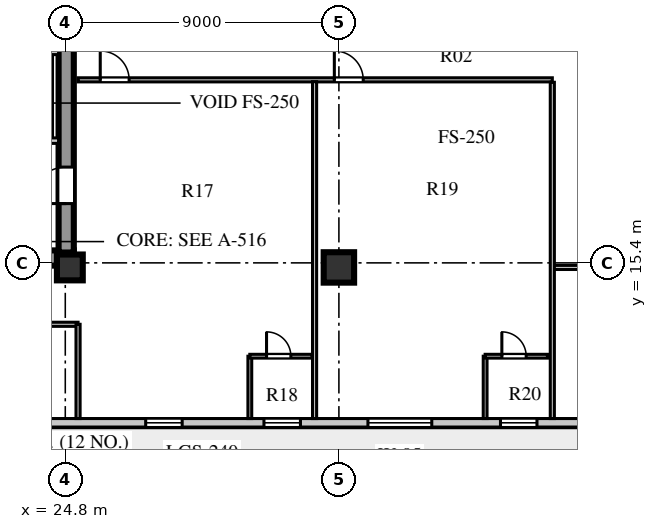
"""IFC4 building model, lengths in metres.
Left out: names, types, materials, properties, quantities, classifications, styles, units other than length and angle.
Written with IfcOpenShell. Run it as: python <this file> out.ifc"""

import sys

from ifc_helpers import new_model, si_unit, direction, frame, frame_2d, origin, origin_2d, place, context, subcontext, project, spatial, rectangle, extrude, element, fill, save


model = new_model("IFC4")
c1 = context("Model", 3, precision=1e-05, world=origin(), true_north=direction((0.0, 1.0)))
c2 = subcontext(c1, "Body", "Model", "MODEL_VIEW")
j1 = project(units=[si_unit("LENGTHUNIT", "METRE"), si_unit("PLANEANGLEUNIT", "RADIAN")], contexts=[c1])
p1 = place(None, origin())
s1 = spatial("IfcSite", under=j1, at=p1, CompositionType="ELEMENT")
p2 = place(p1, origin())
s2 = spatial("IfcBuilding", under=s1, at=p2, CompositionType="ELEMENT")
p3 = place(p2, frame((0.0, 0.0, 119.4)))
s3 = spatial("IfcBuildingStorey", under=s2, at=p3, CompositionType="ELEMENT", Elevation=119.4)
p4 = place(p3, frame((15.4, 15.56, 0.0), z_axis=(0.0, 0.0, 1.0), x_axis=(1.0, 0.0, 0.0)))
e1 = element("IfcWall", 1, at=p4, inside=s3, PredefinedType="SHEAR", context=c2, shape_type="SweptSolid", body=[
    extrude(rectangle(XDim=9.68, YDim=0.5, at=frame_2d((4.84, 0.0))), origin(), (0.0, 0.0, 1.0), 3.6),
])
p5 = place(p3, frame((24.83, 15.74, 0.0), z_axis=(0.0, 0.0, 1.0), x_axis=(0.0, 1.0, 0.0)))
e2 = element("IfcWall", 2, at=p5, inside=s3, PredefinedType="SHEAR", context=c2, shape_type="SweptSolid", body=[
    extrude(rectangle(XDim=25.76, YDim=0.5, at=frame_2d((12.88, 0.0))), origin(), (0.0, 0.0, 1.0), 3.6),
])
p6 = place(p5, frame((1.61, 0.0, 0.0)))
e3 = element("IfcOpeningElement", 3, at=p6, cuts=e2, PredefinedType="OPENING", context=c2, shape_type="SweptSolid", body=[
    extrude(rectangle(XDim=1.2, YDim=2.1, at=frame_2d((0.6, 1.05))), frame((0.0, 0.26, 0.0), z_axis=(0.0, -1.0, 0.0), x_axis=(1.0, 0.0, 0.0)), (0.0, 0.0, 1.0), 0.52),
])
p7 = place(p5, frame((6.78, 0.0, 0.0)))
e4 = element("IfcOpeningElement", 4, at=p7, cuts=e2, PredefinedType="OPENING", context=c2, shape_type="SweptSolid", body=[
    extrude(rectangle(XDim=0.85, YDim=2.06, at=frame_2d((0.425, 1.03))), frame((0.0, 0.26, 0.0), z_axis=(0.0, -1.0, 0.0), x_axis=(1.0, 0.0, 0.0)), (0.0, 0.0, 1.0), 0.52),
])
p8 = place(p5, frame((12.11, 0.0, 0.0)))
e5 = element("IfcOpeningElement", 5, at=p8, cuts=e2, PredefinedType="OPENING", context=c2, shape_type="SweptSolid", body=[
    extrude(rectangle(XDim=1.5, YDim=2.12, at=frame_2d((0.75, 1.06))), frame((0.0, 0.26, 0.0), z_axis=(0.0, -1.0, 0.0), x_axis=(1.0, 0.0, 0.0)), (0.0, 0.0, 1.0), 0.52),
])
p9 = place(p5, frame((20.11, 0.0, 0.0)))
e6 = element("IfcOpeningElement", 6, at=p9, cuts=e2, PredefinedType="OPENING", context=c2, shape_type="SweptSolid", body=[
    extrude(rectangle(XDim=1.2, YDim=2.12, at=frame_2d((0.6, 1.06))), frame((0.0, 0.26, 0.0), z_axis=(0.0, -1.0, 0.0), x_axis=(1.0, 0.0, 0.0)), (0.0, 0.0, 1.0), 0.52),
])
p10 = place(p5, frame((24.01, 0.0, 0.0)))
e7 = element("IfcOpeningElement", 7, at=p10, cuts=e2, PredefinedType="OPENING", context=c2, shape_type="SweptSolid", body=[
    extrude(rectangle(XDim=0.95, YDim=2.1, at=frame_2d((0.475, 1.05))), frame((0.0, 0.26, 0.0), z_axis=(0.0, -1.0, 0.0), x_axis=(1.0, 0.0, 0.0)), (0.0, 0.0, 1.0), 0.52),
])
p11 = place(p3, frame((24.95, 15.25, 0.0), z_axis=(0.0, 0.0, 1.0), x_axis=(1.0, 0.0, 0.0)))
e8 = element("IfcColumn", 8, at=p11, inside=s3, PredefinedType="COLUMN", context=c2, shape_type="SweptSolid", body=[
    extrude(rectangle(XDim=0.85, YDim=0.85, at=origin_2d()), origin(), (0.0, 0.0, 1.0), 3.6),
])
p12 = place(p3, frame((33.8, 15.25, 0.0), z_axis=(0.0, 0.0, 1.0), x_axis=(1.0, 0.0, 0.0)))
e9 = element("IfcColumn", 9, at=p12, inside=s3, PredefinedType="COLUMN", context=c2, shape_type="SweptSolid", body=[
    extrude(rectangle(XDim=1.0, YDim=1.0, at=origin_2d()), origin(), (0.0, 0.0, 1.0), 3.6),
])
p13 = place(p3, frame((13.25, 10.14, 0.0), z_axis=(0.0, 0.0, 1.0), x_axis=(1.0, 0.0, 0.0)))
e10 = element("IfcWall", 10, at=p13, inside=s3, PredefinedType="STANDARD", context=c2, shape_type="SweptSolid", body=[
    extrude(rectangle(XDim=32.1, YDim=0.28, at=frame_2d((16.05, 0.0))), origin(), (0.0, 0.0, 1.0), 3.6),
])
p14 = place(p13, frame((0.95, 0.0, 0.0)))
e11 = element("IfcOpeningElement", 11, at=p14, cuts=e10, PredefinedType="OPENING", context=c2, shape_type="SweptSolid", body=[
    extrude(rectangle(XDim=1.0, YDim=2.05, at=frame_2d((0.5, 1.025))), frame((0.0, 0.15, 0.0), z_axis=(0.0, -1.0, 0.0), x_axis=(1.0, 0.0, 0.0)), (0.0, 0.0, 1.0), 0.3),
])
p15 = place(p13, frame((6.18, 0.0, 0.8)))
e12 = element("IfcOpeningElement", 12, at=p15, cuts=e10, PredefinedType="OPENING", context=c2, shape_type="SweptSolid", body=[
    extrude(rectangle(XDim=1.5, YDim=2.0, at=frame_2d((0.75, 1.0))), frame((0.0, 0.15, 0.0), z_axis=(0.0, -1.0, 0.0), x_axis=(1.0, 0.0, 0.0)), (0.0, 0.0, 1.0), 0.3),
])
p16 = place(p13, frame((14.195, 0.0, 0.8)))
e13 = element("IfcOpeningElement", 13, at=p16, cuts=e10, PredefinedType="OPENING", context=c2, shape_type="SweptSolid", body=[
    extrude(rectangle(XDim=1.2, YDim=1.75, at=frame_2d((0.6, 0.875))), frame((0.0, 0.15, 0.0), z_axis=(0.0, -1.0, 0.0), x_axis=(1.0, 0.0, 0.0)), (0.0, 0.0, 1.0), 0.3),
])
p17 = place(p13, frame((18.085, 0.0, 0.8)))
e14 = element("IfcOpeningElement", 14, at=p17, cuts=e10, PredefinedType="OPENING", context=c2, shape_type="SweptSolid", body=[
    extrude(rectangle(XDim=1.2, YDim=1.75, at=frame_2d((0.6, 0.875))), frame((0.0, 0.15, 0.0), z_axis=(0.0, -1.0, 0.0), x_axis=(1.0, 0.0, 0.0)), (0.0, 0.0, 1.0), 0.3),
])
p18 = place(p13, frame((21.505, 0.0, 0.8)))
e15 = element("IfcOpeningElement", 15, at=p18, cuts=e10, PredefinedType="OPENING", context=c2, shape_type="SweptSolid", body=[
    extrude(rectangle(XDim=2.1, YDim=1.95, at=frame_2d((1.05, 0.975))), frame((0.0, 0.15, 0.0), z_axis=(0.0, -1.0, 0.0), x_axis=(1.0, 0.0, 0.0)), (0.0, 0.0, 1.0), 0.3),
])
p19 = place(p13, frame((25.865, 0.0, 0.8)))
e16 = element("IfcOpeningElement", 16, at=p19, cuts=e10, PredefinedType="OPENING", context=c2, shape_type="SweptSolid", body=[
    extrude(rectangle(XDim=1.2, YDim=1.75, at=frame_2d((0.6, 0.875))), frame((0.0, 0.15, 0.0), z_axis=(0.0, -1.0, 0.0), x_axis=(1.0, 0.0, 0.0)), (0.0, 0.0, 1.0), 0.3),
])
p20 = place(p13, frame((28.955, 0.0, 0.8)))
e17 = element("IfcOpeningElement", 17, at=p20, cuts=e10, PredefinedType="OPENING", context=c2, shape_type="SweptSolid", body=[
    extrude(rectangle(XDim=1.65, YDim=1.95, at=frame_2d((0.825, 0.975))), frame((0.0, 0.15, 0.0), z_axis=(0.0, -1.0, 0.0), x_axis=(1.0, 0.0, 0.0)), (0.0, 0.0, 1.0), 0.3),
])
p21 = place(p3, frame((19.64, 19.42, 0.0), z_axis=(0.0, 0.0, 1.0), x_axis=(1.0, 0.0, 0.0)))
e18 = element("IfcWall", 18, at=p21, inside=s3, PredefinedType="SOLIDWALL", context=c2, shape_type="SweptSolid", body=[
    extrude(rectangle(XDim=4.94, YDim=0.18, at=frame_2d((2.47, 0.0))), origin(), (0.0, 0.0, 1.0), 3.6),
])
p22 = place(p21, frame((0.72, 0.0, 0.0)))
e19 = element("IfcOpeningElement", 19, at=p22, cuts=e18, PredefinedType="OPENING", context=c2, shape_type="SweptSolid", body=[
    extrude(rectangle(XDim=1.1, YDim=2.1, at=frame_2d((0.55, 1.05))), frame((0.0, 0.1, 0.0), z_axis=(0.0, -1.0, 0.0), x_axis=(1.0, 0.0, 0.0)), (0.0, 0.0, 1.0), 0.2),
])
p23 = place(p21, frame((3.02, 0.0, 0.0)))
e20 = element("IfcOpeningElement", 20, at=p23, cuts=e18, PredefinedType="OPENING", context=c2, shape_type="SweptSolid", body=[
    extrude(rectangle(XDim=1.1, YDim=2.1, at=frame_2d((0.55, 1.05))), frame((0.0, 0.1, 0.0), z_axis=(0.0, -1.0, 0.0), x_axis=(1.0, 0.0, 0.0)), (0.0, 0.0, 1.0), 0.2),
])
p24 = place(p3, frame((19.64, 22.34, 0.0), z_axis=(0.0, 0.0, 1.0), x_axis=(1.0, 0.0, 0.0)))
e21 = element("IfcWall", 21, at=p24, inside=s3, PredefinedType="SOLIDWALL", context=c2, shape_type="SweptSolid", body=[
    extrude(rectangle(XDim=4.94, YDim=0.18, at=frame_2d((2.47, 0.0))), origin(), (0.0, 0.0, 1.0), 3.6),
])
p25 = place(p3, frame((25.22, 21.42, 0.0), z_axis=(0.0, 0.0, 1.0), x_axis=(1.0, 0.0, 0.0)))
e22 = element("IfcWall", 22, at=p25, inside=s3, PredefinedType="PARTITIONING", context=c2, shape_type="SweptSolid", body=[
    extrude(rectangle(XDim=15.6, YDim=0.135, at=frame_2d((7.8, 0.0))), origin(), (0.0, 0.0, 1.0), 3.2),
])
p26 = place(p25, frame((0.73, 0.0, 0.0)))
e23 = element("IfcOpeningElement", 23, at=p26, cuts=e22, PredefinedType="OPENING", context=c2, shape_type="SweptSolid", body=[
    extrude(rectangle(XDim=0.95, YDim=2.1, at=frame_2d((0.475, 1.05))), frame((0.0, 0.078, 0.0), z_axis=(0.0, -1.0, 0.0), x_axis=(1.0, 0.0, 0.0)), (0.0, 0.0, 1.0), 0.155),
])
p27 = place(p25, frame((8.43, 0.0, 0.0)))
e24 = element("IfcOpeningElement", 24, at=p27, cuts=e22, PredefinedType="OPENING", context=c2, shape_type="SweptSolid", body=[
    extrude(rectangle(XDim=0.95, YDim=2.1, at=frame_2d((0.475, 1.05))), frame((0.0, 0.078, 0.0), z_axis=(0.0, -1.0, 0.0), x_axis=(1.0, 0.0, 0.0)), (0.0, 0.0, 1.0), 0.155),
])
p28 = place(p3, frame((40.82, 15.25, 0.0), z_axis=(0.0, 0.0, 1.0), x_axis=(1.0, 0.0, 0.0)))
e25 = element("IfcWall", 25, at=p28, inside=s3, PredefinedType="PARTITIONING", context=c2, shape_type="SweptSolid", body=[
    extrude(rectangle(XDim=7.3, YDim=0.135, at=frame_2d((3.65, 0.0))), origin(), (0.0, 0.0, 1.0), 2.95),
])
p29 = place(p3, frame((13.59, 13.38, 0.0), z_axis=(0.0, 0.0, 1.0), x_axis=(1.0, 0.0, 0.0)))
e26 = element("IfcWall", 26, at=p29, inside=s3, PredefinedType="PARTITIONING", context=c2, shape_type="SweptSolid", body=[
    extrude(rectangle(XDim=11.63, YDim=0.135, at=frame_2d((5.815, 0.0))), origin(), (0.0, 0.0, 1.0), 3.6),
])
p30 = place(p29, frame((4.56, 0.0, 0.0)))
e27 = element("IfcOpeningElement", 27, at=p30, cuts=e26, PredefinedType="OPENING", context=c2, shape_type="SweptSolid", body=[
    extrude(rectangle(XDim=1.0, YDim=2.08, at=frame_2d((0.5, 1.04))), frame((0.0, 0.078, 0.0), z_axis=(0.0, -1.0, 0.0), x_axis=(1.0, 0.0, 0.0)), (0.0, 0.0, 1.0), 0.155),
])
p31 = place(p3, frame((25.22, 10.28, 0.0), z_axis=(0.0, 0.0, 1.0), x_axis=(0.0, 1.0, 0.0)))
e28 = element("IfcWall", 28, at=p31, inside=s3, PredefinedType="PARTITIONING", context=c2, shape_type="SweptSolid", body=[
    extrude(rectangle(XDim=3.1, YDim=0.135, at=frame_2d((1.55, 0.0))), origin(), (0.0, 0.0, 1.0), 3.1),
])
p32 = place(p3, frame((40.82, 10.28, 0.0), z_axis=(0.0, 0.0, 1.0), x_axis=(0.0, 1.0, 0.0)))
e29 = element("IfcWall", 29, at=p32, inside=s3, PredefinedType="PARTITIONING", context=c2, shape_type="SweptSolid", body=[
    extrude(rectangle(XDim=11.06, YDim=0.135, at=frame_2d((5.53, 0.0))), origin(), (0.0, 0.0, 1.0), 3.6),
])
p33 = place(p3, frame((30.87, 10.28, 0.0), z_axis=(0.0, 0.0, 1.0), x_axis=(0.0, 1.0, 0.0)))
e30 = element("IfcWall", 30, at=p33, inside=s3, PredefinedType="PLUMBINGWALL", context=c2, shape_type="SweptSolid", body=[
    extrude(rectangle(XDim=2.05, YDim=0.125, at=frame_2d((1.025, 0.0))), origin(), (0.0, 0.0, 1.0), 3.6),
])
p34 = place(p3, frame((30.87, 12.33, 0.0), z_axis=(0.0, 0.0, 1.0), x_axis=(1.0, 0.0, 0.0)))
e31 = element("IfcWall", 31, at=p34, inside=s3, PredefinedType="PLUMBINGWALL", context=c2, shape_type="SweptSolid", body=[
    extrude(rectangle(XDim=2.05, YDim=0.125, at=frame_2d((1.025, 0.0))), origin(), (0.0, 0.0, 1.0), 3.6),
])
p35 = place(p34, frame((0.55, 0.0, 0.0)))
e32 = element("IfcOpeningElement", 32, at=p35, cuts=e31, PredefinedType="OPENING", context=c2, shape_type="SweptSolid", body=[
    extrude(rectangle(XDim=0.8, YDim=2.05, at=frame_2d((0.4, 1.025))), frame((0.0, 0.073, 0.0), z_axis=(0.0, -1.0, 0.0), x_axis=(1.0, 0.0, 0.0)), (0.0, 0.0, 1.0), 0.145),
])
p36 = place(p3, frame((33.0, 10.28, 0.0), z_axis=(0.0, 0.0, 1.0), x_axis=(0.0, 1.0, 0.0)))
e33 = element("IfcWall", 33, at=p36, inside=s3, PredefinedType="PARTITIONING", context=c2, shape_type="SweptSolid", body=[
    extrude(rectangle(XDim=11.08, YDim=0.135, at=frame_2d((5.54, 0.0))), origin(), (0.0, 0.0, 1.0), 3.6),
])
p37 = place(p3, frame((38.61, 10.28, 0.0), z_axis=(0.0, 0.0, 1.0), x_axis=(0.0, 1.0, 0.0)))
e34 = element("IfcWall", 34, at=p37, inside=s3, PredefinedType="PLUMBINGWALL", context=c2, shape_type="SweptSolid", body=[
    extrude(rectangle(XDim=2.05, YDim=0.125, at=frame_2d((1.025, 0.0))), origin(), (0.0, 0.0, 1.0), 3.6),
])
p38 = place(p3, frame((38.61, 12.33, 0.0), z_axis=(0.0, 0.0, 1.0), x_axis=(1.0, 0.0, 0.0)))
e35 = element("IfcWall", 35, at=p38, inside=s3, PredefinedType="PLUMBINGWALL", context=c2, shape_type="SweptSolid", body=[
    extrude(rectangle(XDim=2.05, YDim=0.125, at=frame_2d((1.025, 0.0))), origin(), (0.0, 0.0, 1.0), 3.6),
])
p39 = place(p38, frame((0.55, 0.0, 0.0)))
e36 = element("IfcOpeningElement", 36, at=p39, cuts=e35, PredefinedType="OPENING", context=c2, shape_type="SweptSolid", body=[
    extrude(rectangle(XDim=0.8, YDim=2.05, at=frame_2d((0.4, 1.025))), frame((0.0, 0.073, 0.0), z_axis=(0.0, -1.0, 0.0), x_axis=(1.0, 0.0, 0.0)), (0.0, 0.0, 1.0), 0.145),
])
p40 = place(p16, origin())
e37 = element("IfcWindow", 37, at=p40, inside=s3, PartitioningType="SINGLE_PANEL", PredefinedType="WINDOW", context=c2, shape_type="SweptSolid", body=[
    extrude(rectangle(XDim=1.2, YDim=1.75, at=frame_2d((0.6, 0.875))), frame((0.0, 0.03, 0.0), z_axis=(0.0, -1.0, 0.0), x_axis=(1.0, 0.0, 0.0)), (0.0, 0.0, 1.0), 0.06),
])
fill(e13, e37)
p41 = place(p17, origin())
e38 = element("IfcWindow", 38, at=p41, inside=s3, PartitioningType="SINGLE_PANEL", PredefinedType="WINDOW", context=c2, shape_type="SweptSolid", body=[
    extrude(rectangle(XDim=1.2, YDim=1.75, at=frame_2d((0.6, 0.875))), frame((0.0, 0.03, 0.0), z_axis=(0.0, -1.0, 0.0), x_axis=(1.0, 0.0, 0.0)), (0.0, 0.0, 1.0), 0.06),
])
fill(e14, e38)
p42 = place(p18, origin())
e39 = element("IfcWindow", 39, at=p42, inside=s3, PartitioningType="SINGLE_PANEL", PredefinedType="WINDOW", context=c2, shape_type="SweptSolid", body=[
    extrude(rectangle(XDim=2.1, YDim=1.95, at=frame_2d((1.05, 0.975))), frame((0.0, 0.03, 0.0), z_axis=(0.0, -1.0, 0.0), x_axis=(1.0, 0.0, 0.0)), (0.0, 0.0, 1.0), 0.06),
])
fill(e15, e39)
p43 = place(p19, origin())
e40 = element("IfcWindow", 40, at=p43, inside=s3, PartitioningType="SINGLE_PANEL", PredefinedType="WINDOW", context=c2, shape_type="SweptSolid", body=[
    extrude(rectangle(XDim=1.2, YDim=1.75, at=frame_2d((0.6, 0.875))), frame((0.0, 0.03, 0.0), z_axis=(0.0, -1.0, 0.0), x_axis=(1.0, 0.0, 0.0)), (0.0, 0.0, 1.0), 0.06),
])
fill(e16, e40)
p44 = place(p6, frame((1.2, 0.0, 0.0), z_axis=(0.0, 0.0, 1.0), x_axis=(-1.0, 0.0, 0.0)))
e41 = element("IfcDoor", 41, at=p44, inside=s3, OperationType="SINGLE_SWING_RIGHT", PredefinedType="DOOR", context=c2, shape_type="SweptSolid", body=[
    extrude(rectangle(XDim=1.2, YDim=2.1, at=frame_2d((0.6, 1.05))), frame((0.0, 0.025, 0.0), z_axis=(0.0, -1.0, 0.0), x_axis=(1.0, 0.0, 0.0)), (0.0, 0.0, 1.0), 0.05),
])
fill(e3, e41)
p45 = place(p26, frame((0.95, 0.0, 0.0), z_axis=(0.0, 0.0, 1.0), x_axis=(-1.0, 0.0, 0.0)))
e42 = element("IfcDoor", 42, at=p45, inside=s3, OperationType="SINGLE_SWING_RIGHT", PredefinedType="DOOR", context=c2, shape_type="SweptSolid", body=[
    extrude(rectangle(XDim=0.95, YDim=2.1, at=frame_2d((0.475, 1.05))), frame((0.0, 0.025, 0.0), z_axis=(0.0, -1.0, 0.0), x_axis=(1.0, 0.0, 0.0)), (0.0, 0.0, 1.0), 0.05),
])
fill(e23, e42)
p46 = place(p35, origin())
e43 = element("IfcDoor", 43, at=p46, inside=s3, OperationType="SINGLE_SWING_LEFT", PredefinedType="DOOR", context=c2, shape_type="SweptSolid", body=[
    extrude(rectangle(XDim=0.8, YDim=2.05, at=frame_2d((0.4, 1.025))), frame((0.0, 0.025, 0.0), z_axis=(0.0, -1.0, 0.0), x_axis=(1.0, 0.0, 0.0)), (0.0, 0.0, 1.0), 0.05),
])
fill(e32, e43)
p47 = place(p27, frame((0.95, 0.0, 0.0), z_axis=(0.0, 0.0, 1.0), x_axis=(-1.0, 0.0, 0.0)))
e44 = element("IfcDoor", 44, at=p47, inside=s3, OperationType="SINGLE_SWING_RIGHT", PredefinedType="DOOR", context=c2, shape_type="SweptSolid", body=[
    extrude(rectangle(XDim=0.95, YDim=2.1, at=frame_2d((0.475, 1.05))), frame((0.0, 0.025, 0.0), z_axis=(0.0, -1.0, 0.0), x_axis=(1.0, 0.0, 0.0)), (0.0, 0.0, 1.0), 0.05),
])
fill(e24, e44)
p48 = place(p39, origin())
e45 = element("IfcDoor", 45, at=p48, inside=s3, OperationType="SINGLE_SWING_LEFT", PredefinedType="DOOR", context=c2, shape_type="SweptSolid", body=[
    extrude(rectangle(XDim=0.8, YDim=2.05, at=frame_2d((0.4, 1.025))), frame((0.0, 0.025, 0.0), z_axis=(0.0, -1.0, 0.0), x_axis=(1.0, 0.0, 0.0)), (0.0, 0.0, 1.0), 0.05),
])
fill(e36, e45)
save(model, sys.argv[1])
